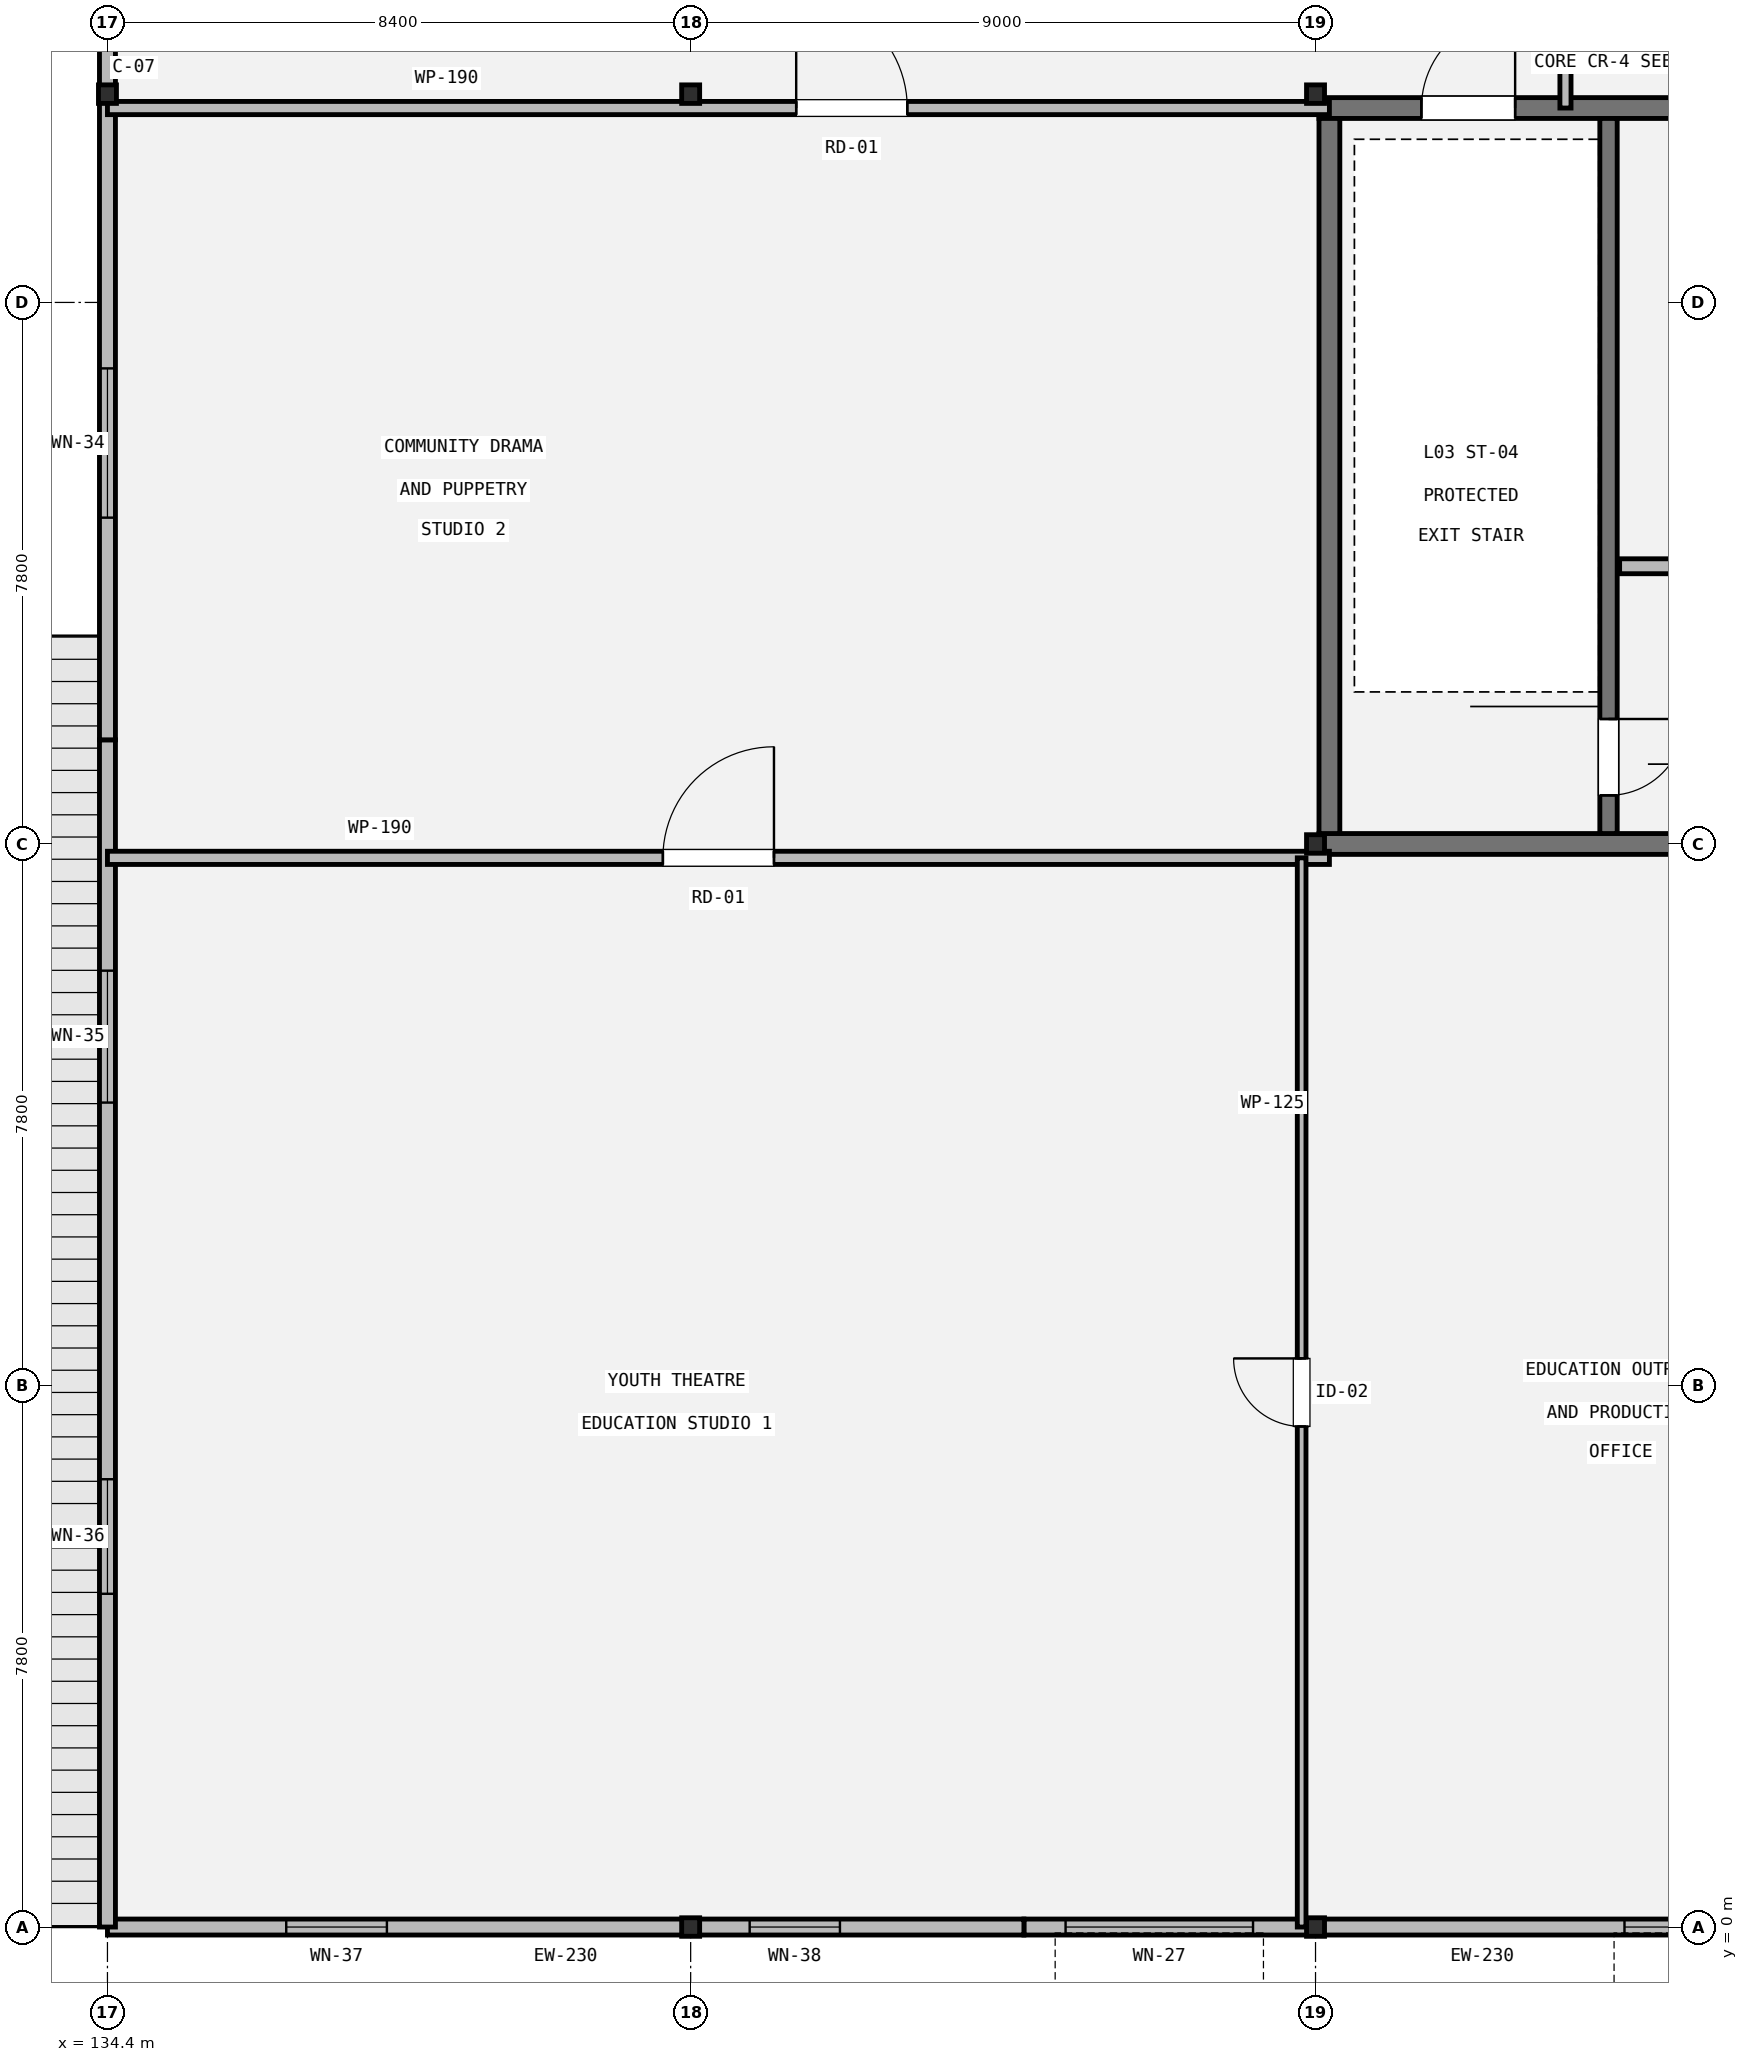
"""IFC4 building model, lengths in metres.
Left out: names, types, materials, properties, quantities, classifications, styles, units other than length and angle.
Written with IfcOpenShell. Run it as: python <this file> out.ifc"""

import sys

from ifc_helpers import new_model, si_unit, direction, frame, frame_2d, origin, origin_2d, place, context, subcontext, project, spatial, rectangle, i_section, extrude, element, fill, save


model = new_model("IFC4")
c1 = context("Model", 3, precision=1e-05, world=origin(), true_north=direction((0.0, 1.0)))
c2 = subcontext(c1, "Body", "Model", "MODEL_VIEW")
j1 = project(units=[si_unit("LENGTHUNIT", "METRE"), si_unit("PLANEANGLEUNIT", "RADIAN")], contexts=[c1])
p1 = place(None, origin())
s1 = spatial("IfcSite", under=j1, at=p1, CompositionType="ELEMENT")
p2 = place(p1, origin())
s2 = spatial("IfcBuilding", under=s1, at=p2, CompositionType="ELEMENT")
p3 = place(p2, frame((0.0, 0.0, 15.0)))
s3 = spatial("IfcBuildingStorey", under=s2, at=p3, CompositionType="ELEMENT", Elevation=15.0)
for number, where, z_axis, x_axis in (
    (1, (134.4, 26.4, 0.0), (0.0, 0.0, 1.0), (1.0, 0.0, 0.0)),
    (2, (142.8, 0.0, 0.0), (0.0, 0.0, 1.0), (1.0, 0.0, 0.0)),
    (3, (142.8, 26.4, 0.0), (0.0, 0.0, 1.0), (1.0, 0.0, 0.0)),
    (4, (151.8, 0.0, 0.0), (0.0, 0.0, 1.0), (1.0, 0.0, 0.0)),
    (5, (151.8, 15.6, 0.0), (0.0, 0.0, 1.0), (1.0, 0.0, 0.0)),
    (6, (151.8, 26.4, 0.0), (0.0, 0.0, 1.0), (1.0, 0.0, 0.0)),
):
    element("IfcColumn", number, at=place(p3, frame(where, z_axis=z_axis, x_axis=x_axis)), inside=s3, PredefinedType="COLUMN", context=c2, shape_type="SweptSolid", body=[
        extrude(i_section(OverallWidth=0.259, OverallDepth=0.267, WebThickness=0.013, FlangeThickness=0.021, FilletRadius=0.013, at=origin_2d()), origin(), (0.0, 0.0, 1.0), 4.2),
    ])
p4 = place(p3, frame((160.8, 0.0, 0.0), z_axis=(0.0, 0.0, 1.0), x_axis=(-1.0, 0.0, 0.0)))
e7 = element("IfcWall", 7, at=p4, inside=s3, PredefinedType="STANDARD", context=c2, shape_type="SweptSolid", body=[
    extrude(rectangle(XDim=13.2, YDim=0.23, at=frame_2d((6.6, 0.0))), origin(), (0.0, 0.0, 1.0), 3.952),
])
p5 = place(p4, frame((2.05, 0.0, 0.9)))
e8 = element("IfcOpeningElement", 8, at=p5, cuts=e7, PredefinedType="OPENING", context=c2, shape_type="SweptSolid", body=[
    extrude(rectangle(XDim=2.5, YDim=1.95, at=frame_2d((1.25, 0.975))), frame((0.0, 0.125, 0.0), z_axis=(0.0, -1.0, 0.0), x_axis=(1.0, 0.0, 0.0)), (0.0, 0.0, 1.0), 0.25),
])
p6 = place(p4, frame((9.9, 0.0, 0.9)))
e9 = element("IfcOpeningElement", 9, at=p6, cuts=e7, PredefinedType="OPENING", context=c2, shape_type="SweptSolid", body=[
    extrude(rectangle(XDim=2.7, YDim=1.95, at=frame_2d((1.35, 0.975))), frame((0.0, 0.125, 0.0), z_axis=(0.0, -1.0, 0.0), x_axis=(1.0, 0.0, 0.0)), (0.0, 0.0, 1.0), 0.25),
])
p7 = place(p3, frame((147.6, 0.0, 0.0), z_axis=(0.0, 0.0, 1.0), x_axis=(-1.0, 0.0, 0.0)))
e10 = element("IfcWall", 10, at=p7, inside=s3, PredefinedType="STANDARD", context=c2, shape_type="SweptSolid", body=[
    extrude(rectangle(XDim=13.2, YDim=0.23, at=frame_2d((6.6, 0.0))), origin(), (0.0, 0.0, 1.0), 3.952),
])
p8 = place(p7, frame((2.65, 0.0, 0.9)))
e11 = element("IfcOpeningElement", 11, at=p8, cuts=e10, PredefinedType="OPENING", context=c2, shape_type="SweptSolid", body=[
    extrude(rectangle(XDim=1.3, YDim=1.65, at=frame_2d((0.65, 0.825))), frame((0.0, 0.125, 0.0), z_axis=(0.0, -1.0, 0.0), x_axis=(1.0, 0.0, 0.0)), (0.0, 0.0, 1.0), 0.25),
])
p9 = place(p7, frame((9.175, 0.0, 0.9)))
e12 = element("IfcOpeningElement", 12, at=p9, cuts=e10, PredefinedType="OPENING", context=c2, shape_type="SweptSolid", body=[
    extrude(rectangle(XDim=1.45, YDim=1.65, at=frame_2d((0.725, 0.825))), frame((0.0, 0.125, 0.0), z_axis=(0.0, -1.0, 0.0), x_axis=(1.0, 0.0, 0.0)), (0.0, 0.0, 1.0), 0.25),
])
p10 = place(p3, frame((134.4, 0.0, 0.0), z_axis=(0.0, 0.0, 1.0), x_axis=(0.0, 1.0, 0.0)))
e13 = element("IfcWall", 13, at=p10, inside=s3, PredefinedType="STANDARD", context=c2, shape_type="SweptSolid", body=[
    extrude(rectangle(XDim=17.1, YDim=0.23, at=frame_2d((8.55, 0.0))), origin(), (0.0, 0.0, 1.0), 3.952),
])
p11 = place(p10, frame((4.8, 0.0, 0.9)))
e14 = element("IfcOpeningElement", 14, at=p11, cuts=e13, PredefinedType="OPENING", context=c2, shape_type="SweptSolid", body=[
    extrude(rectangle(XDim=1.65, YDim=1.65, at=frame_2d((0.825, 0.825))), frame((0.0, 0.125, 0.0), z_axis=(0.0, -1.0, 0.0), x_axis=(1.0, 0.0, 0.0)), (0.0, 0.0, 1.0), 0.25),
])
p12 = place(p10, frame((11.875, 0.0, 0.9)))
e15 = element("IfcOpeningElement", 15, at=p12, cuts=e13, PredefinedType="OPENING", context=c2, shape_type="SweptSolid", body=[
    extrude(rectangle(XDim=1.9, YDim=1.65, at=frame_2d((0.95, 0.825))), frame((0.0, 0.125, 0.0), z_axis=(0.0, -1.0, 0.0), x_axis=(1.0, 0.0, 0.0)), (0.0, 0.0, 1.0), 0.25),
])
p13 = place(p3, frame((134.4, 17.1, 0.0), z_axis=(0.0, 0.0, 1.0), x_axis=(0.0, 1.0, 0.0)))
e16 = element("IfcWall", 16, at=p13, inside=s3, PredefinedType="STANDARD", context=c2, shape_type="SweptSolid", body=[
    extrude(rectangle(XDim=17.1, YDim=0.23, at=frame_2d((8.55, 0.0))), origin(), (0.0, 0.0, 1.0), 3.952),
])
p14 = place(p13, frame((3.2, 0.0, 0.9)))
e17 = element("IfcOpeningElement", 17, at=p14, cuts=e16, PredefinedType="OPENING", context=c2, shape_type="SweptSolid", body=[
    extrude(rectangle(XDim=2.15, YDim=1.65, at=frame_2d((1.075, 0.825))), frame((0.0, 0.125, 0.0), z_axis=(0.0, -1.0, 0.0), x_axis=(1.0, 0.0, 0.0)), (0.0, 0.0, 1.0), 0.25),
])
p15 = place(p13, frame((11.625, 0.0, 0.9)))
e18 = element("IfcOpeningElement", 18, at=p15, cuts=e16, PredefinedType="OPENING", context=c2, shape_type="SweptSolid", body=[
    extrude(rectangle(XDim=2.4, YDim=1.65, at=frame_2d((1.2, 0.825))), frame((0.0, 0.125, 0.0), z_axis=(0.0, -1.0, 0.0), x_axis=(1.0, 0.0, 0.0)), (0.0, 0.0, 1.0), 0.25),
])
p16 = place(p3, frame((160.8, 15.6, 0.0), z_axis=(0.0, 0.0, 1.0), x_axis=(-1.0, 0.0, 0.0)))
e19 = element("IfcWall", 19, at=p16, inside=s3, PredefinedType="SHEAR", context=c2, shape_type="SweptSolid", body=[
    extrude(rectangle(XDim=8.95, YDim=0.3, at=frame_2d((4.475, 0.0))), origin(), (0.0, 0.0, 1.0), 4.0),
])
p17 = place(p3, frame((151.85, 26.2, 0.0), z_axis=(0.0, 0.0, 1.0), x_axis=(1.0, 0.0, 0.0)))
e20 = element("IfcWall", 20, at=p17, inside=s3, PredefinedType="SHEAR", context=c2, shape_type="SweptSolid", body=[
    extrude(rectangle(XDim=8.95, YDim=0.3, at=frame_2d((4.475, 0.0))), origin(), (0.0, 0.0, 1.0), 4.0),
])
p18 = place(p17, frame((1.475, 0.0, 0.0)))
e21 = element("IfcOpeningElement", 21, at=p18, cuts=e20, PredefinedType="OPENING", context=c2, shape_type="SweptSolid", body=[
    extrude(rectangle(XDim=1.35, YDim=2.15, at=frame_2d((0.675, 1.075))), frame((0.0, 0.16, 0.0), z_axis=(0.0, -1.0, 0.0), x_axis=(1.0, 0.0, 0.0)), (0.0, 0.0, 1.0), 0.32),
])
p19 = place(p3, frame((152.0, 15.75, 0.0), z_axis=(0.0, 0.0, 1.0), x_axis=(0.0, 1.0, 0.0)))
e22 = element("IfcWall", 22, at=p19, inside=s3, PredefinedType="SHEAR", context=c2, shape_type="SweptSolid", body=[
    extrude(rectangle(XDim=10.3, YDim=0.3, at=frame_2d((5.15, 0.0))), origin(), (0.0, 0.0, 1.0), 4.0),
])
p20 = place(p3, frame((156.02, 26.05, 0.0), z_axis=(0.0, 0.0, 1.0), x_axis=(0.0, -1.0, 0.0)))
e23 = element("IfcWall", 23, at=p20, inside=s3, PredefinedType="SHEAR", context=c2, shape_type="SweptSolid", body=[
    extrude(rectangle(XDim=10.3, YDim=0.25, at=frame_2d((5.15, 0.0))), origin(), (0.0, 0.0, 1.0), 4.0),
])
p21 = place(p20, frame((8.65, 0.0, 0.0)))
e24 = element("IfcOpeningElement", 24, at=p21, cuts=e23, PredefinedType="OPENING", context=c2, shape_type="SweptSolid", body=[
    extrude(rectangle(XDim=1.1, YDim=2.15, at=frame_2d((0.55, 1.075))), frame((0.0, 0.135, 0.0), z_axis=(0.0, -1.0, 0.0), x_axis=(1.0, 0.0, 0.0)), (0.0, 0.0, 1.0), 0.27),
])
p22 = place(p3, frame((156.18, 19.6, 0.0), z_axis=(0.0, 0.0, 1.0), x_axis=(1.0, 0.0, 0.0)))
e25 = element("IfcWall", 25, at=p22, inside=s3, PredefinedType="STANDARD", context=c2, shape_type="SweptSolid", body=[
    extrude(rectangle(XDim=4.3, YDim=0.215, at=frame_2d((2.15, 0.0))), origin(), (0.0, 0.0, 1.0), 3.992),
])
p23 = place(p22, frame((1.625, 0.0, 0.0)))
e26 = element("IfcOpeningElement", 26, at=p23, cuts=e25, PredefinedType="OPENING", context=c2, shape_type="SweptSolid", body=[
    extrude(rectangle(XDim=1.05, YDim=2.15, at=frame_2d((0.525, 1.075))), frame((0.0, 0.117, 0.0), z_axis=(0.0, -1.0, 0.0), x_axis=(1.0, 0.0, 0.0)), (0.0, 0.0, 1.0), 0.235),
])
p24 = place(p3, frame((134.4, 15.4, 0.0), z_axis=(0.0, 0.0, 1.0), x_axis=(1.0, 0.0, 0.0)))
e27 = element("IfcWall", 27, at=p24, inside=s3, PredefinedType="PARTITIONING", context=c2, shape_type="SweptSolid", body=[
    extrude(rectangle(XDim=17.6, YDim=0.19, at=frame_2d((8.8, 0.0))), origin(), (0.0, 0.0, 1.0), 3.952),
])
p25 = place(p24, frame((8.0, 0.0, 0.0)))
e28 = element("IfcOpeningElement", 28, at=p25, cuts=e27, PredefinedType="OPENING", context=c2, shape_type="SweptSolid", body=[
    extrude(rectangle(XDim=1.6, YDim=2.25, at=frame_2d((0.8, 1.125))), frame((0.0, 0.105, 0.0), z_axis=(0.0, -1.0, 0.0), x_axis=(1.0, 0.0, 0.0)), (0.0, 0.0, 1.0), 0.21),
])
p26 = place(p3, frame((134.4, 26.2, 0.0), z_axis=(0.0, 0.0, 1.0), x_axis=(1.0, 0.0, 0.0)))
e29 = element("IfcWall", 29, at=p26, inside=s3, PredefinedType="PARTITIONING", context=c2, shape_type="SweptSolid", body=[
    extrude(rectangle(XDim=17.6, YDim=0.19, at=frame_2d((8.8, 0.0))), origin(), (0.0, 0.0, 1.0), 3.952),
])
p27 = place(p26, frame((9.92, 0.0, 0.0)))
e30 = element("IfcOpeningElement", 30, at=p27, cuts=e29, PredefinedType="OPENING", context=c2, shape_type="SweptSolid", body=[
    extrude(rectangle(XDim=1.6, YDim=2.25, at=frame_2d((0.8, 1.125))), frame((0.0, 0.105, 0.0), z_axis=(0.0, -1.0, 0.0), x_axis=(1.0, 0.0, 0.0)), (0.0, 0.0, 1.0), 0.21),
])
p28 = place(p3, frame((151.6, 0.0, 0.0), z_axis=(0.0, 0.0, 1.0), x_axis=(0.0, 1.0, 0.0)))
e31 = element("IfcWall", 31, at=p28, inside=s3, PredefinedType="PARTITIONING", context=c2, shape_type="SweptSolid", body=[
    extrude(rectangle(XDim=15.4, YDim=0.125, at=frame_2d((7.7, 0.0))), origin(), (0.0, 0.0, 1.0), 3.952),
])
p29 = place(p28, frame((7.21, 0.0, 0.0)))
e32 = element("IfcOpeningElement", 32, at=p29, cuts=e31, PredefinedType="OPENING", context=c2, shape_type="SweptSolid", body=[
    extrude(rectangle(XDim=0.98, YDim=2.1, at=frame_2d((0.49, 1.05))), frame((0.0, 0.073, 0.0), z_axis=(0.0, -1.0, 0.0), x_axis=(1.0, 0.0, 0.0)), (0.0, 0.0, 1.0), 0.145),
])
p30 = place(p3, frame((155.4, 26.2, 0.0), z_axis=(0.0, 0.0, 1.0), x_axis=(0.0, 1.0, 0.0)))
e33 = element("IfcWall", 33, at=p30, inside=s3, PredefinedType="PLUMBINGWALL", context=c2, shape_type="SweptSolid", body=[
    extrude(rectangle(XDim=8.0, YDim=0.16, at=frame_2d((4.0, 0.0))), origin(), (0.0, 0.0, 1.0), 3.952),
])
p31 = place(p30, frame((3.525, 0.0, 0.0)))
e34 = element("IfcOpeningElement", 34, at=p31, cuts=e33, PredefinedType="OPENING", context=c2, shape_type="SweptSolid", body=[
    extrude(rectangle(XDim=0.95, YDim=2.1, at=frame_2d((0.475, 1.05))), frame((0.0, 0.09, 0.0), z_axis=(0.0, -1.0, 0.0), x_axis=(1.0, 0.0, 0.0)), (0.0, 0.0, 1.0), 0.18),
])
p32 = place(p5, origin())
e35 = element("IfcWindow", 35, at=p32, inside=s3, PartitioningType="SINGLE_PANEL", PredefinedType="WINDOW", context=c2, shape_type="SweptSolid", body=[
    extrude(rectangle(XDim=2.5, YDim=1.95, at=frame_2d((1.25, 0.975))), frame((0.0, 0.03, 0.0), z_axis=(0.0, -1.0, 0.0), x_axis=(1.0, 0.0, 0.0)), (0.0, 0.0, 1.0), 0.06),
])
fill(e8, e35)
p33 = place(p6, origin())
e36 = element("IfcWindow", 36, at=p33, inside=s3, PartitioningType="SINGLE_PANEL", PredefinedType="WINDOW", context=c2, shape_type="SweptSolid", body=[
    extrude(rectangle(XDim=2.7, YDim=1.95, at=frame_2d((1.35, 0.975))), frame((0.0, 0.03, 0.0), z_axis=(0.0, -1.0, 0.0), x_axis=(1.0, 0.0, 0.0)), (0.0, 0.0, 1.0), 0.06),
])
fill(e9, e36)
p34 = place(p8, origin())
e37 = element("IfcWindow", 37, at=p34, inside=s3, PartitioningType="SINGLE_PANEL", PredefinedType="WINDOW", context=c2, shape_type="SweptSolid", body=[
    extrude(rectangle(XDim=1.3, YDim=1.65, at=frame_2d((0.65, 0.825))), frame((0.0, 0.03, 0.0), z_axis=(0.0, -1.0, 0.0), x_axis=(1.0, 0.0, 0.0)), (0.0, 0.0, 1.0), 0.06),
])
fill(e11, e37)
p35 = place(p9, origin())
e38 = element("IfcWindow", 38, at=p35, inside=s3, PartitioningType="SINGLE_PANEL", PredefinedType="WINDOW", context=c2, shape_type="SweptSolid", body=[
    extrude(rectangle(XDim=1.45, YDim=1.65, at=frame_2d((0.725, 0.825))), frame((0.0, 0.03, 0.0), z_axis=(0.0, -1.0, 0.0), x_axis=(1.0, 0.0, 0.0)), (0.0, 0.0, 1.0), 0.06),
])
fill(e12, e38)
p36 = place(p11, origin())
e39 = element("IfcWindow", 39, at=p36, inside=s3, PartitioningType="SINGLE_PANEL", PredefinedType="WINDOW", context=c2, shape_type="SweptSolid", body=[
    extrude(rectangle(XDim=1.65, YDim=1.65, at=frame_2d((0.825, 0.825))), frame((0.0, 0.03, 0.0), z_axis=(0.0, -1.0, 0.0), x_axis=(1.0, 0.0, 0.0)), (0.0, 0.0, 1.0), 0.06),
])
fill(e14, e39)
p37 = place(p12, origin())
e40 = element("IfcWindow", 40, at=p37, inside=s3, PartitioningType="SINGLE_PANEL", PredefinedType="WINDOW", context=c2, shape_type="SweptSolid", body=[
    extrude(rectangle(XDim=1.9, YDim=1.65, at=frame_2d((0.95, 0.825))), frame((0.0, 0.03, 0.0), z_axis=(0.0, -1.0, 0.0), x_axis=(1.0, 0.0, 0.0)), (0.0, 0.0, 1.0), 0.06),
])
fill(e15, e40)
p38 = place(p14, origin())
e41 = element("IfcWindow", 41, at=p38, inside=s3, PartitioningType="SINGLE_PANEL", PredefinedType="WINDOW", context=c2, shape_type="SweptSolid", body=[
    extrude(rectangle(XDim=2.15, YDim=1.65, at=frame_2d((1.075, 0.825))), frame((0.0, 0.03, 0.0), z_axis=(0.0, -1.0, 0.0), x_axis=(1.0, 0.0, 0.0)), (0.0, 0.0, 1.0), 0.06),
])
fill(e17, e41)
p39 = place(p21, origin())
e42 = element("IfcDoor", 42, at=p39, inside=s3, OperationType="SINGLE_SWING_LEFT", PredefinedType="DOOR", context=c2, shape_type="SweptSolid", body=[
    extrude(rectangle(XDim=1.1, YDim=2.15, at=frame_2d((0.55, 1.075))), frame((0.0, 0.025, 0.0), z_axis=(0.0, -1.0, 0.0), x_axis=(1.0, 0.0, 0.0)), (0.0, 0.0, 1.0), 0.05),
])
fill(e24, e42)
p40 = place(p18, origin())
e43 = element("IfcDoor", 43, at=p40, inside=s3, OperationType="SINGLE_SWING_RIGHT", PredefinedType="DOOR", context=c2, shape_type="SweptSolid", body=[
    extrude(rectangle(XDim=1.35, YDim=2.15, at=frame_2d((0.675, 1.075))), frame((0.0, 0.025, 0.0), z_axis=(0.0, -1.0, 0.0), x_axis=(1.0, 0.0, 0.0)), (0.0, 0.0, 1.0), 0.05),
])
fill(e21, e43)
p41 = place(p25, origin())
e44 = element("IfcDoor", 44, at=p41, inside=s3, OperationType="SINGLE_SWING_RIGHT", PredefinedType="DOOR", context=c2, shape_type="SweptSolid", body=[
    extrude(rectangle(XDim=1.6, YDim=2.25, at=frame_2d((0.8, 1.125))), frame((0.0, 0.025, 0.0), z_axis=(0.0, -1.0, 0.0), x_axis=(1.0, 0.0, 0.0)), (0.0, 0.0, 1.0), 0.05),
])
fill(e28, e44)
p42 = place(p27, origin())
e45 = element("IfcDoor", 45, at=p42, inside=s3, OperationType="SINGLE_SWING_LEFT", PredefinedType="DOOR", context=c2, shape_type="SweptSolid", body=[
    extrude(rectangle(XDim=1.6, YDim=2.25, at=frame_2d((0.8, 1.125))), frame((0.0, 0.025, 0.0), z_axis=(0.0, -1.0, 0.0), x_axis=(1.0, 0.0, 0.0)), (0.0, 0.0, 1.0), 0.05),
])
fill(e30, e45)
p43 = place(p29, origin())
e46 = element("IfcDoor", 46, at=p43, inside=s3, OperationType="SINGLE_SWING_RIGHT", PredefinedType="DOOR", context=c2, shape_type="SweptSolid", body=[
    extrude(rectangle(XDim=0.98, YDim=2.1, at=frame_2d((0.49, 1.05))), frame((0.0, 0.025, 0.0), z_axis=(0.0, -1.0, 0.0), x_axis=(1.0, 0.0, 0.0)), (0.0, 0.0, 1.0), 0.05),
])
fill(e32, e46)
save(model, sys.argv[1])
